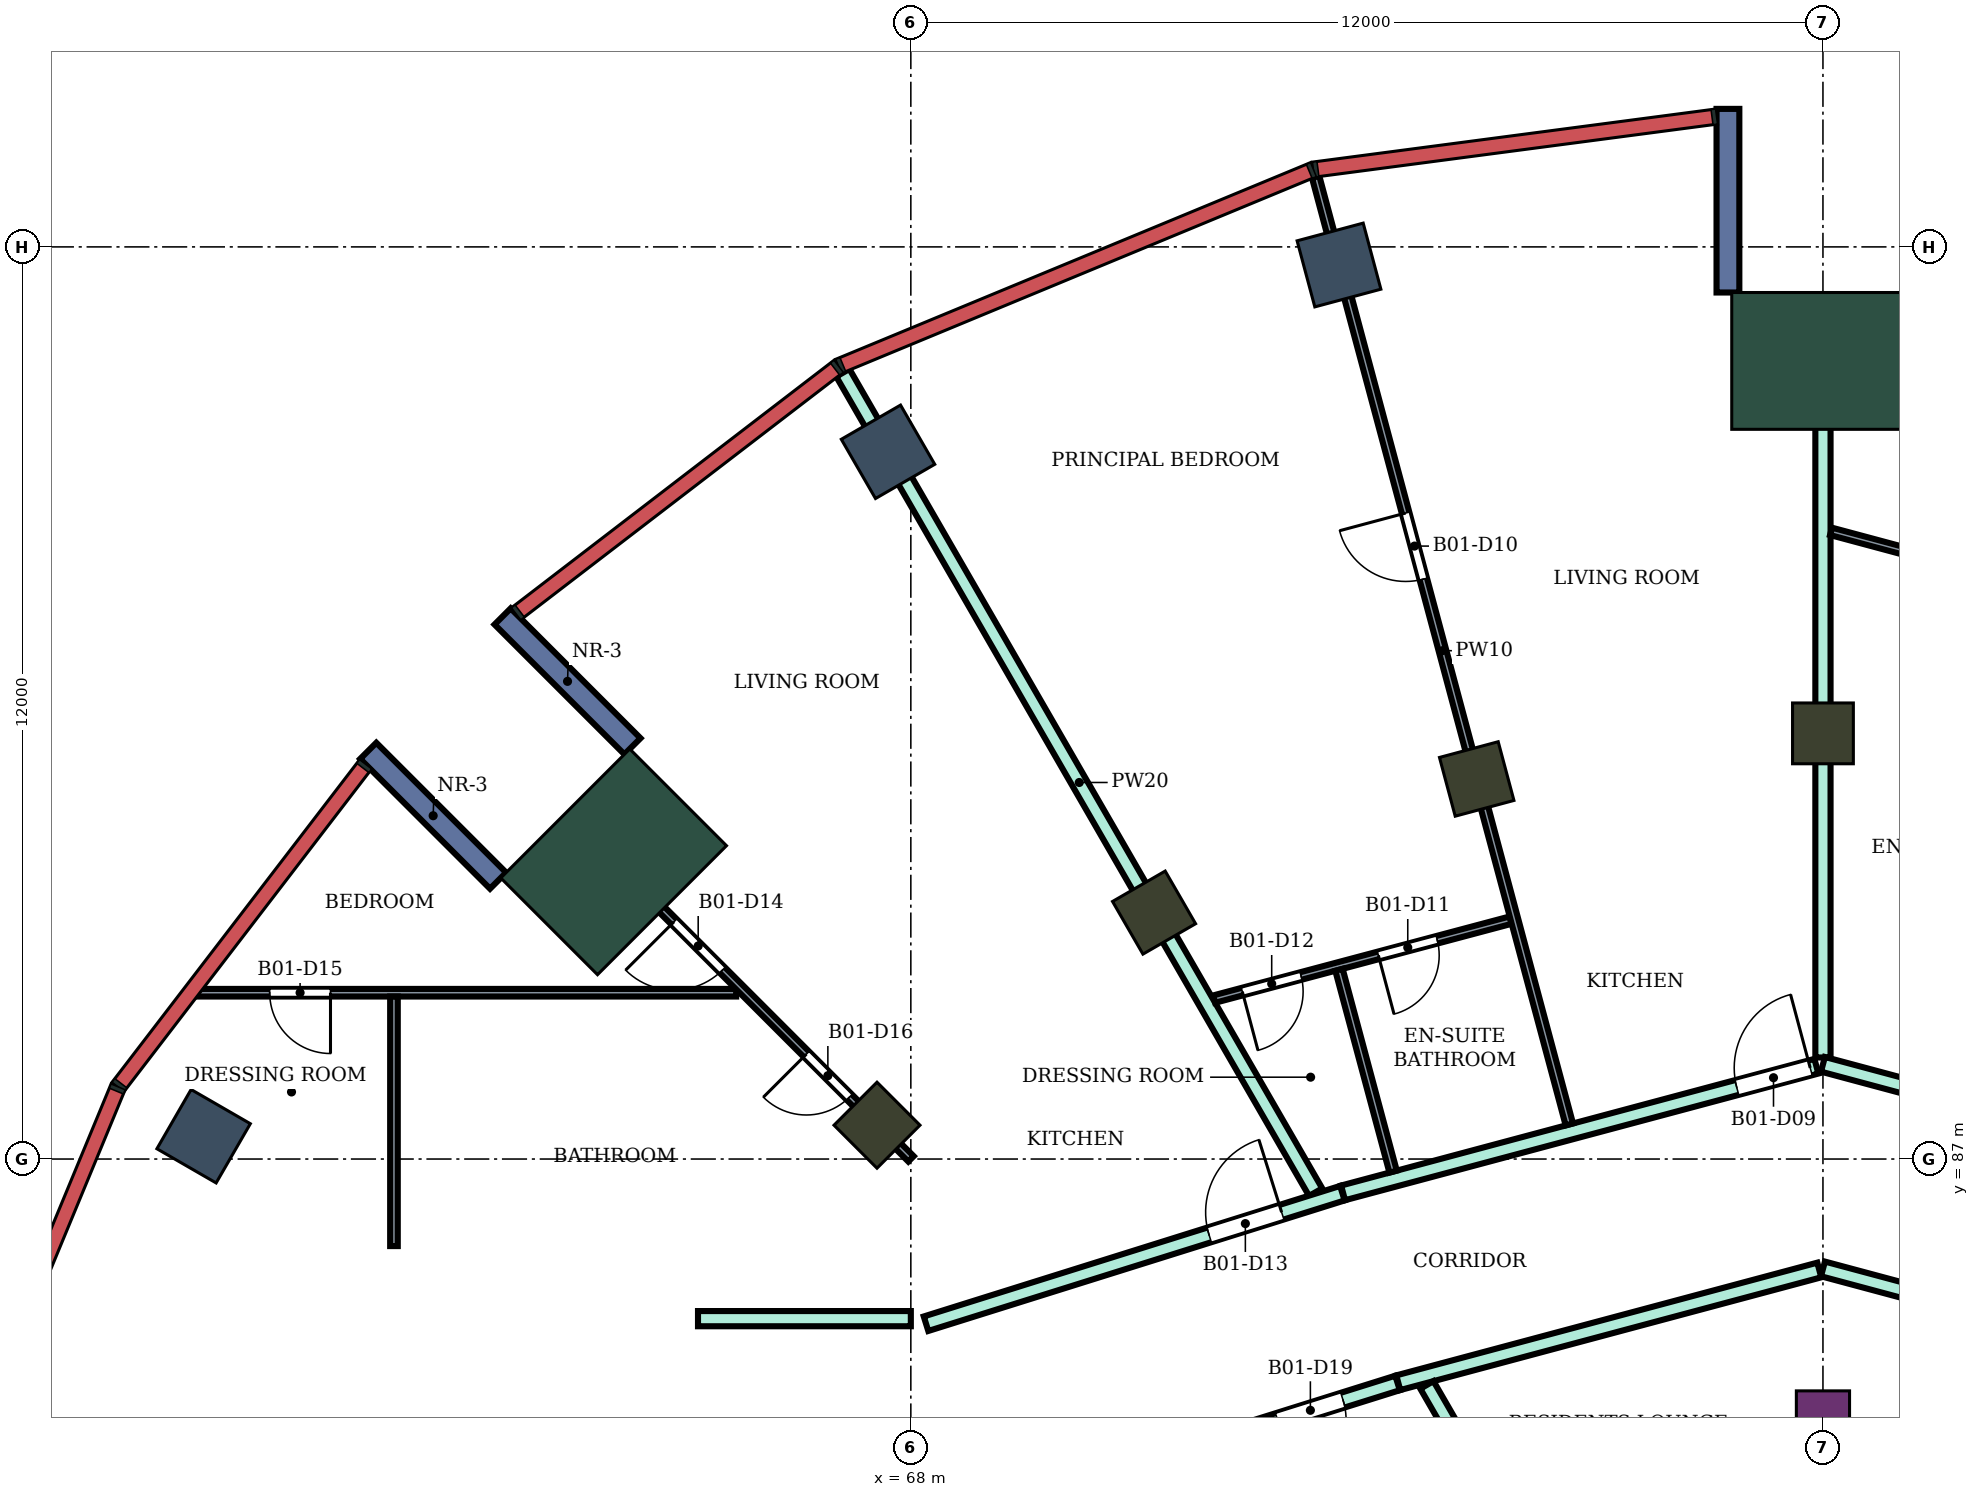
"""IFC4 building model, lengths in metres.
Left out: names, types, materials, properties, quantities, classifications, styles, units other than length and angle.
Written with IfcOpenShell. Run it as: python <this file> out.ifc"""

import sys

from ifc_helpers import new_model, si_unit, direction, frame, frame_2d, origin, origin_2d, place, context, subcontext, project, spatial, rectangle, extrude, element, fill, save


model = new_model("IFC4")
c1 = context("Model", 3, precision=1e-05, world=origin(), true_north=direction((0.0, 1.0)))
c2 = subcontext(c1, "Body", "Model", "MODEL_VIEW")
j1 = project(units=[si_unit("LENGTHUNIT", "METRE"), si_unit("PLANEANGLEUNIT", "RADIAN")], contexts=[c1])
p1 = place(None, origin())
s1 = spatial("IfcSite", under=j1, at=p1, CompositionType="ELEMENT")
p2 = place(p1, origin())
s2 = spatial("IfcBuilding", under=s1, at=p2, CompositionType="ELEMENT")
p3 = place(p2, frame((0.0, 0.0, 212.5)))
s3 = spatial("IfcBuildingStorey", under=s2, at=p3, CompositionType="ELEMENT", Elevation=212.5)
for number, where, z_axis, x_axis in (
    (1, (73.633, 98.762, 0.0), (0.0, 0.0, 1.0), (-0.259, 0.966, 0.0)),
    (2, (67.7, 96.304, 0.0), (0.0, 0.0, 1.0), (-0.5, 0.866, 0.0)),
    (3, (58.696, 87.3, 0.0), (0.0, 0.0, 1.0), (-0.866, 0.5, 0.0)),
):
    element("IfcColumn", number, at=place(p3, frame(where, z_axis=z_axis, x_axis=x_axis)), inside=s3, PredefinedType="COLUMN", context=c2, shape_type="SweptSolid", body=[
        extrude(rectangle(XDim=0.9, YDim=0.9, at=origin_2d()), origin(), (0.0, 0.0, 1.0), 4.2),
    ])
for number, where, z_axis, x_axis in (
    (4, (80.0, 92.6, 0.0), (0.0, 0.0, 1.0), (0.0, 1.0, 0.0)),
    (5, (75.445, 92.0, 0.0), (0.0, 0.0, 1.0), (-0.259, 0.966, 0.0)),
    (6, (71.2, 90.242, 0.0), (0.0, 0.0, 1.0), (-0.5, 0.866, 0.0)),
    (7, (67.555, 87.445, 0.0), (0.0, 0.0, 1.0), (-0.707, 0.707, 0.0)),
):
    element("IfcColumn", number, at=place(p3, frame(where, z_axis=z_axis, x_axis=x_axis)), inside=s3, PredefinedType="COLUMN", context=c2, shape_type="SweptSolid", body=[
        extrude(rectangle(XDim=0.8, YDim=0.8, at=origin_2d()), origin(), (0.0, 0.0, 1.0), 4.2),
    ])
p4 = place(p3, frame((80.0, 83.6, 0.0), z_axis=(0.0, 0.0, 1.0), x_axis=(0.0, 1.0, 0.0)))
e8 = element("IfcColumn", 8, at=p4, inside=s3, PredefinedType="COLUMN", context=c2, shape_type="SweptSolid", body=[
    extrude(rectangle(XDim=0.7, YDim=0.7, at=origin_2d()), origin(), (0.0, 0.0, 1.0), 4.2),
])
for number, where, z_axis, x_axis in (
    (9, (80.0, 97.5, 0.0), (0.0, 0.0, 1.0), (0.0, 1.0, 0.0)),
    (10, (64.09, 90.91, 0.0), (0.0, 0.0, 1.0), (-0.707, 0.707, 0.0)),
):
    element("IfcColumn", number, at=place(p3, frame(where, z_axis=z_axis, x_axis=x_axis)), inside=s3, PredefinedType="COLUMN", context=c2, shape_type="SweptSolid", body=[
        extrude(rectangle(XDim=1.8, YDim=2.4, at=origin_2d()), origin(), (0.0, 0.0, 1.0), 4.2),
    ])
for number, where, z_axis, x_axis in (
    (11, (78.75, 98.4, 0.0), (0.0, 0.0, 1.0), (0.0, 1.0, 0.0)),
    (12, (64.338, 92.43, 0.0), (0.0, 0.0, 1.0), (-0.707, 0.707, 0.0)),
    (13, (62.57, 90.662, 0.0), (0.0, 0.0, 1.0), (-0.707, 0.707, 0.0)),
):
    element("IfcWall", number, at=place(p3, frame(where, z_axis=z_axis, x_axis=x_axis)), inside=s3, PredefinedType="NOTDEFINED", context=c2, shape_type="SweptSolid", body=[
        extrude(rectangle(XDim=2.416, YDim=0.3, at=frame_2d((1.208, 0.0))), origin(), (0.0, 0.0, 1.0), 4.2),
    ])
p5 = place(p3, frame((65.2, 84.9, 0.0), z_axis=(0.0, 0.0, 1.0), x_axis=(1.0, 0.0, 0.0)))
e14 = element("IfcWall", 14, at=p5, inside=s3, PredefinedType="PARTITIONING", context=c2, shape_type="SweptSolid", body=[
    extrude(rectangle(XDim=2.8, YDim=0.2, at=frame_2d((1.4, 0.0))), origin(), (0.0, 0.0, 1.0), 3.75),
])
p6 = place(p3, frame((67.105, 97.344, 0.0), z_axis=(0.0, 0.0, 1.0), x_axis=(0.499841888023, -0.866116670534, 0.0)))
e15 = element("IfcWall", 15, at=p6, inside=s3, PredefinedType="PARTITIONING", context=c2, shape_type="SweptSolid", body=[
    extrude(rectangle(XDim=12.446, YDim=0.2, at=frame_2d((6.223, 0.0))), origin(), (0.0, 0.0, 1.0), 3.75),
])
p7 = place(p3, frame((68.2, 84.833, 0.0), z_axis=(0.0, 0.0, 1.0), x_axis=(0.954204109499, 0.299156342762, 0.0)))
e16 = element("IfcWall", 16, at=p7, inside=s3, PredefinedType="PARTITIONING", context=c2, shape_type="SweptSolid", body=[
    extrude(rectangle(XDim=5.74, YDim=0.2, at=frame_2d((2.87, 0.0))), origin(), (0.0, 0.0, 1.0), 3.75),
])
p8 = place(p7, frame((3.903, 0.0, 0.0)))
e17 = element("IfcOpeningElement", 17, at=p8, cuts=e16, PredefinedType="OPENING", context=c2, shape_type="SweptSolid", body=[
    extrude(rectangle(XDim=1.0, YDim=2.1, at=frame_2d((0.5, 1.05))), frame((0.0, 0.11, 0.0), z_axis=(0.0, -1.0, 0.0), x_axis=(1.0, 0.0, 0.0)), (0.0, 0.0, 1.0), 0.22),
])
p9 = place(p3, frame((72.1, 83.332, 0.0), z_axis=(0.0, 0.0, 1.0), x_axis=(0.954233106619, 0.299063836383, 0.0)))
e18 = element("IfcWall", 18, at=p9, inside=s3, PredefinedType="PARTITIONING", context=c2, shape_type="SweptSolid", body=[
    extrude(rectangle(XDim=2.414, YDim=0.2, at=frame_2d((1.207, 0.0))), origin(), (0.0, 0.0, 1.0), 3.75),
])
p10 = place(p9, frame((0.762, 0.0, 0.0)))
e19 = element("IfcOpeningElement", 19, at=p10, cuts=e18, PredefinedType="OPENING", context=c2, shape_type="SweptSolid", body=[
    extrude(rectangle(XDim=0.9, YDim=2.1, at=frame_2d((0.45, 1.05))), frame((0.0, 0.11, 0.0), z_axis=(0.0, -1.0, 0.0), x_axis=(1.0, 0.0, 0.0)), (0.0, 0.0, 1.0), 0.22),
])
p11 = place(p3, frame((73.687, 86.555, 0.0), z_axis=(0.0, 0.0, 1.0), x_axis=(0.966020868517, 0.258464081818, 0.0)))
e20 = element("IfcWall", 20, at=p11, inside=s3, PredefinedType="PARTITIONING", context=c2, shape_type="SweptSolid", body=[
    extrude(rectangle(XDim=6.446, YDim=0.2, at=frame_2d((3.223, 0.0))), origin(), (0.0, 0.0, 1.0), 3.75),
])
p12 = place(p11, frame((5.362, 0.0, 0.0)))
e21 = element("IfcOpeningElement", 21, at=p12, cuts=e20, PredefinedType="OPENING", context=c2, shape_type="SweptSolid", body=[
    extrude(rectangle(XDim=1.0, YDim=2.1, at=frame_2d((0.5, 1.05))), frame((0.0, 0.11, 0.0), z_axis=(0.0, -1.0, 0.0), x_axis=(1.0, 0.0, 0.0)), (0.0, 0.0, 1.0), 0.22),
])
p13 = place(p3, frame((74.413, 84.057, 0.0), z_axis=(0.0, 0.0, 1.0), x_axis=(0.965970849692, 0.258650956976, 0.0)))
e22 = element("IfcWall", 22, at=p13, inside=s3, PredefinedType="PARTITIONING", context=c2, shape_type="SweptSolid", body=[
    extrude(rectangle(XDim=5.734, YDim=0.2, at=frame_2d((2.867, 0.0))), origin(), (0.0, 0.0, 1.0), 3.75),
])
p14 = place(p3, frame((74.79, 84.028, 0.0), z_axis=(0.0, 0.0, 1.0), x_axis=(0.499820708267, -0.866128893172, 0.0)))
e23 = element("IfcWall", 23, at=p14, inside=s3, PredefinedType="PARTITIONING", context=c2, shape_type="SweptSolid", body=[
    extrude(rectangle(XDim=2.725, YDim=0.2, at=frame_2d((1.362, 0.0))), origin(), (0.0, 0.0, 1.0), 3.75),
])
p15 = place(p3, frame((80.0, 85.554, 0.0), z_axis=(0.0, 0.0, 1.0), x_axis=(0.965894438951, -0.258936155845, 0.0)))
e24 = element("IfcWall", 24, at=p15, inside=s3, PredefinedType="PARTITIONING", context=c2, shape_type="SweptSolid", body=[
    extrude(rectangle(XDim=5.774, YDim=0.2, at=frame_2d((2.887, 0.0))), origin(), (0.0, 0.0, 1.0), 3.75),
])
p16 = place(p15, frame((1.841, 0.0, 0.0)))
e25 = element("IfcOpeningElement", 25, at=p16, cuts=e24, PredefinedType="OPENING", context=c2, shape_type="SweptSolid", body=[
    extrude(rectangle(XDim=1.8, YDim=2.1, at=frame_2d((0.9, 1.05))), frame((0.0, 0.11, 0.0), z_axis=(0.0, -1.0, 0.0), x_axis=(1.0, 0.0, 0.0)), (0.0, 0.0, 1.0), 0.22),
])
p17 = place(p3, frame((80.0, 88.336, 0.0), z_axis=(0.0, 0.0, 1.0), x_axis=(0.0, 1.0, 0.0)))
e26 = element("IfcWall", 26, at=p17, inside=s3, PredefinedType="PARTITIONING", context=c2, shape_type="SweptSolid", body=[
    extrude(rectangle(XDim=9.864, YDim=0.2, at=frame_2d((4.932, 0.0))), origin(), (0.0, 0.0, 1.0), 3.75),
])
p18 = place(p3, frame((80.0, 88.246, 0.0), z_axis=(0.0, 0.0, 1.0), x_axis=(0.965866355913, -0.25904088966, 0.0)))
e27 = element("IfcWall", 27, at=p18, inside=s3, PredefinedType="PARTITIONING", context=c2, shape_type="SweptSolid", body=[
    extrude(rectangle(XDim=6.526, YDim=0.2, at=frame_2d((3.263, 0.0))), origin(), (0.0, 0.0, 1.0), 3.75),
])
p19 = place(p3, frame((58.6, 89.188, 0.0), z_axis=(0.0, 0.0, 1.0), x_axis=(1.0, 0.0, 0.0)))
e28 = element("IfcWall", 28, at=p19, inside=s3, PredefinedType="PARTITIONING", context=c2, shape_type="SweptSolid", body=[
    extrude(rectangle(XDim=7.102, YDim=0.1, at=frame_2d((3.551, 0.0))), origin(), (0.0, 0.0, 1.0), 3.75),
])
p20 = place(p19, frame((0.965, 0.0, 0.0)))
e29 = element("IfcOpeningElement", 29, at=p20, cuts=e28, PredefinedType="OPENING", context=c2, shape_type="SweptSolid", body=[
    extrude(rectangle(XDim=0.8, YDim=2.1, at=frame_2d((0.4, 1.05))), frame((0.0, 0.06, 0.0), z_axis=(0.0, -1.0, 0.0), x_axis=(1.0, 0.0, 0.0)), (0.0, 0.0, 1.0), 0.12),
])
p21 = place(p3, frame((61.2, 85.855, 0.0), z_axis=(0.0, 0.0, 1.0), x_axis=(0.0, 1.0, 0.0)))
e30 = element("IfcWall", 30, at=p21, inside=s3, PredefinedType="PARTITIONING", context=c2, shape_type="SweptSolid", body=[
    extrude(rectangle(XDim=3.283, YDim=0.1, at=frame_2d((1.642, 0.0))), origin(), (0.0, 0.0, 1.0), 3.75),
])
p22 = place(p3, frame((63.598, 91.408, 0.0), z_axis=(0.0, 0.0, 1.0), x_axis=(0.70693039891, -0.707283119477, 0.0)))
e31 = element("IfcWall", 31, at=p22, inside=s3, PredefinedType="PARTITIONING", context=c2, shape_type="SweptSolid", body=[
    extrude(rectangle(XDim=6.229, YDim=0.1, at=frame_2d((3.115, 0.0))), origin(), (0.0, 0.0, 1.0), 3.75),
])
p23 = place(p22, frame((1.819, 0.0, 0.0)))
e32 = element("IfcOpeningElement", 32, at=p23, cuts=e31, PredefinedType="OPENING", context=c2, shape_type="SweptSolid", body=[
    extrude(rectangle(XDim=0.9, YDim=2.1, at=frame_2d((0.45, 1.05))), frame((0.0, 0.06, 0.0), z_axis=(0.0, -1.0, 0.0), x_axis=(1.0, 0.0, 0.0)), (0.0, 0.0, 1.0), 0.12),
])
p24 = place(p22, frame((4.282, 0.0, 0.0)))
e33 = element("IfcOpeningElement", 33, at=p24, cuts=e31, PredefinedType="OPENING", context=c2, shape_type="SweptSolid", body=[
    extrude(rectangle(XDim=0.8, YDim=2.1, at=frame_2d((0.4, 1.05))), frame((0.0, 0.06, 0.0), z_axis=(0.0, -1.0, 0.0), x_axis=(1.0, 0.0, 0.0)), (0.0, 0.0, 1.0), 0.12),
])
p25 = place(p3, frame((71.991, 89.104, 0.0), z_axis=(0.0, 0.0, 1.0), x_axis=(0.96632826418, 0.257312428472, 0.0)))
e34 = element("IfcWall", 34, at=p25, inside=s3, PredefinedType="PARTITIONING", context=c2, shape_type="SweptSolid", body=[
    extrude(rectangle(XDim=4.035, YDim=0.1, at=frame_2d((2.018, 0.0))), origin(), (0.0, 0.0, 1.0), 3.75),
])
p26 = place(p25, frame((2.235, 0.0, 0.0)))
e35 = element("IfcOpeningElement", 35, at=p26, cuts=e34, PredefinedType="OPENING", context=c2, shape_type="SweptSolid", body=[
    extrude(rectangle(XDim=0.8, YDim=2.1, at=frame_2d((0.4, 1.05))), frame((0.0, 0.06, 0.0), z_axis=(0.0, -1.0, 0.0), x_axis=(1.0, 0.0, 0.0)), (0.0, 0.0, 1.0), 0.12),
])
p27 = place(p25, frame((0.383, 0.0, 0.0)))
e36 = element("IfcOpeningElement", 36, at=p27, cuts=e34, PredefinedType="OPENING", context=c2, shape_type="SweptSolid", body=[
    extrude(rectangle(XDim=0.8, YDim=2.1, at=frame_2d((0.4, 1.05))), frame((0.0, 0.06, 0.0), z_axis=(0.0, -1.0, 0.0), x_axis=(1.0, 0.0, 0.0)), (0.0, 0.0, 1.0), 0.12),
])
p28 = place(p3, frame((73.326, 99.92, 0.0), z_axis=(0.0, 0.0, 1.0), x_axis=(0.258675243249, -0.965964346407, 0.0)))
e37 = element("IfcWall", 37, at=p28, inside=s3, PredefinedType="PARTITIONING", context=c2, shape_type="SweptSolid", body=[
    extrude(rectangle(XDim=12.904, YDim=0.1, at=frame_2d((6.452, 0.0))), origin(), (0.0, 0.0, 1.0), 3.75),
])
p29 = place(p28, frame((4.577, 0.0, 0.0)))
e38 = element("IfcOpeningElement", 38, at=p29, cuts=e37, PredefinedType="OPENING", context=c2, shape_type="SweptSolid", body=[
    extrude(rectangle(XDim=0.9, YDim=2.1, at=frame_2d((0.45, 1.05))), frame((0.0, 0.06, 0.0), z_axis=(0.0, -1.0, 0.0), x_axis=(1.0, 0.0, 0.0)), (0.0, 0.0, 1.0), 0.12),
])
p30 = place(p3, frame((73.633, 89.49, 0.0), z_axis=(0.0, 0.0, 1.0), x_axis=(0.259005329799, -0.965875892201, 0.0)))
e39 = element("IfcWall", 39, at=p30, inside=s3, PredefinedType="PARTITIONING", context=c2, shape_type="SweptSolid", body=[
    extrude(rectangle(XDim=2.75, YDim=0.1, at=frame_2d((1.375, 0.0))), origin(), (0.0, 0.0, 1.0), 3.75),
])
p31 = place(p3, frame((80.106, 95.258, 0.0), z_axis=(0.0, 0.0, 1.0), x_axis=(0.965862886122, -0.259053826862, 0.0)))
e40 = element("IfcWall", 40, at=p31, inside=s3, PredefinedType="PARTITIONING", context=c2, shape_type="SweptSolid", body=[
    extrude(rectangle(XDim=10.331, YDim=0.1, at=frame_2d((5.166, 0.0))), origin(), (0.0, 0.0, 1.0), 3.75),
])
p32 = place(p31, frame((2.115, 0.0, 0.0)))
e41 = element("IfcOpeningElement", 41, at=p32, cuts=e40, PredefinedType="OPENING", context=c2, shape_type="SweptSolid", body=[
    extrude(rectangle(XDim=0.8, YDim=2.1, at=frame_2d((0.4, 1.05))), frame((0.0, 0.06, 0.0), z_axis=(0.0, -1.0, 0.0), x_axis=(1.0, 0.0, 0.0)), (0.0, 0.0, 1.0), 0.12),
])
p33 = place(p12, origin())
e42 = element("IfcDoor", 42, at=p33, inside=s3, OperationType="SINGLE_SWING_RIGHT", PredefinedType="DOOR", context=c2, shape_type="SweptSolid", body=[
    extrude(rectangle(XDim=1.0, YDim=2.1, at=frame_2d((0.5, 1.05))), frame((0.0, 0.025, 0.0), z_axis=(0.0, -1.0, 0.0), x_axis=(1.0, 0.0, 0.0)), (0.0, 0.0, 1.0), 0.05),
])
fill(e21, e42)
p34 = place(p29, frame((0.9, 0.0, 0.0), z_axis=(0.0, 0.0, 1.0), x_axis=(-1.0, 0.0, 0.0)))
e43 = element("IfcDoor", 43, at=p34, inside=s3, OperationType="SINGLE_SWING_RIGHT", PredefinedType="DOOR", context=c2, shape_type="SweptSolid", body=[
    extrude(rectangle(XDim=0.9, YDim=2.1, at=frame_2d((0.45, 1.05))), frame((0.0, 0.025, 0.0), z_axis=(0.0, -1.0, 0.0), x_axis=(1.0, 0.0, 0.0)), (0.0, 0.0, 1.0), 0.05),
])
fill(e38, e43)
p35 = place(p26, frame((0.8, 0.0, 0.0), z_axis=(0.0, 0.0, 1.0), x_axis=(-1.0, 0.0, 0.0)))
e44 = element("IfcDoor", 44, at=p35, inside=s3, OperationType="SINGLE_SWING_RIGHT", PredefinedType="DOOR", context=c2, shape_type="SweptSolid", body=[
    extrude(rectangle(XDim=0.8, YDim=2.1, at=frame_2d((0.4, 1.05))), frame((0.0, 0.025, 0.0), z_axis=(0.0, -1.0, 0.0), x_axis=(1.0, 0.0, 0.0)), (0.0, 0.0, 1.0), 0.05),
])
fill(e35, e44)
p36 = place(p27, frame((0.8, 0.0, 0.0), z_axis=(0.0, 0.0, 1.0), x_axis=(-1.0, 0.0, 0.0)))
e45 = element("IfcDoor", 45, at=p36, inside=s3, OperationType="SINGLE_SWING_RIGHT", PredefinedType="DOOR", context=c2, shape_type="SweptSolid", body=[
    extrude(rectangle(XDim=0.8, YDim=2.1, at=frame_2d((0.4, 1.05))), frame((0.0, 0.025, 0.0), z_axis=(0.0, -1.0, 0.0), x_axis=(1.0, 0.0, 0.0)), (0.0, 0.0, 1.0), 0.05),
])
fill(e36, e45)
p37 = place(p8, origin())
e46 = element("IfcDoor", 46, at=p37, inside=s3, OperationType="SINGLE_SWING_RIGHT", PredefinedType="DOOR", context=c2, shape_type="SweptSolid", body=[
    extrude(rectangle(XDim=1.0, YDim=2.1, at=frame_2d((0.5, 1.05))), frame((0.0, 0.025, 0.0), z_axis=(0.0, -1.0, 0.0), x_axis=(1.0, 0.0, 0.0)), (0.0, 0.0, 1.0), 0.05),
])
fill(e17, e46)
p38 = place(p23, frame((0.9, 0.0, 0.0), z_axis=(0.0, 0.0, 1.0), x_axis=(-1.0, 0.0, 0.0)))
e47 = element("IfcDoor", 47, at=p38, inside=s3, OperationType="SINGLE_SWING_RIGHT", PredefinedType="DOOR", context=c2, shape_type="SweptSolid", body=[
    extrude(rectangle(XDim=0.9, YDim=2.1, at=frame_2d((0.45, 1.05))), frame((0.0, 0.025, 0.0), z_axis=(0.0, -1.0, 0.0), x_axis=(1.0, 0.0, 0.0)), (0.0, 0.0, 1.0), 0.05),
])
fill(e32, e47)
p39 = place(p20, frame((0.8, 0.0, 0.0), z_axis=(0.0, 0.0, 1.0), x_axis=(-1.0, 0.0, 0.0)))
e48 = element("IfcDoor", 48, at=p39, inside=s3, OperationType="SINGLE_SWING_LEFT", PredefinedType="DOOR", context=c2, shape_type="SweptSolid", body=[
    extrude(rectangle(XDim=0.8, YDim=2.1, at=frame_2d((0.4, 1.05))), frame((0.0, 0.025, 0.0), z_axis=(0.0, -1.0, 0.0), x_axis=(1.0, 0.0, 0.0)), (0.0, 0.0, 1.0), 0.05),
])
fill(e29, e48)
p40 = place(p24, frame((0.8, 0.0, 0.0), z_axis=(0.0, 0.0, 1.0), x_axis=(-1.0, 0.0, 0.0)))
e49 = element("IfcDoor", 49, at=p40, inside=s3, OperationType="SINGLE_SWING_RIGHT", PredefinedType="DOOR", context=c2, shape_type="SweptSolid", body=[
    extrude(rectangle(XDim=0.8, YDim=2.1, at=frame_2d((0.4, 1.05))), frame((0.0, 0.025, 0.0), z_axis=(0.0, -1.0, 0.0), x_axis=(1.0, 0.0, 0.0)), (0.0, 0.0, 1.0), 0.05),
])
fill(e33, e49)
p41 = place(p10, frame((0.9, 0.0, 0.0), z_axis=(0.0, 0.0, 1.0), x_axis=(-1.0, 0.0, 0.0)))
e50 = element("IfcDoor", 50, at=p41, inside=s3, OperationType="SINGLE_SWING_RIGHT", PredefinedType="DOOR", context=c2, shape_type="SweptSolid", body=[
    extrude(rectangle(XDim=0.9, YDim=2.1, at=frame_2d((0.45, 1.05))), frame((0.0, 0.025, 0.0), z_axis=(0.0, -1.0, 0.0), x_axis=(1.0, 0.0, 0.0)), (0.0, 0.0, 1.0), 0.05),
])
fill(e19, e50)
save(model, sys.argv[1])
